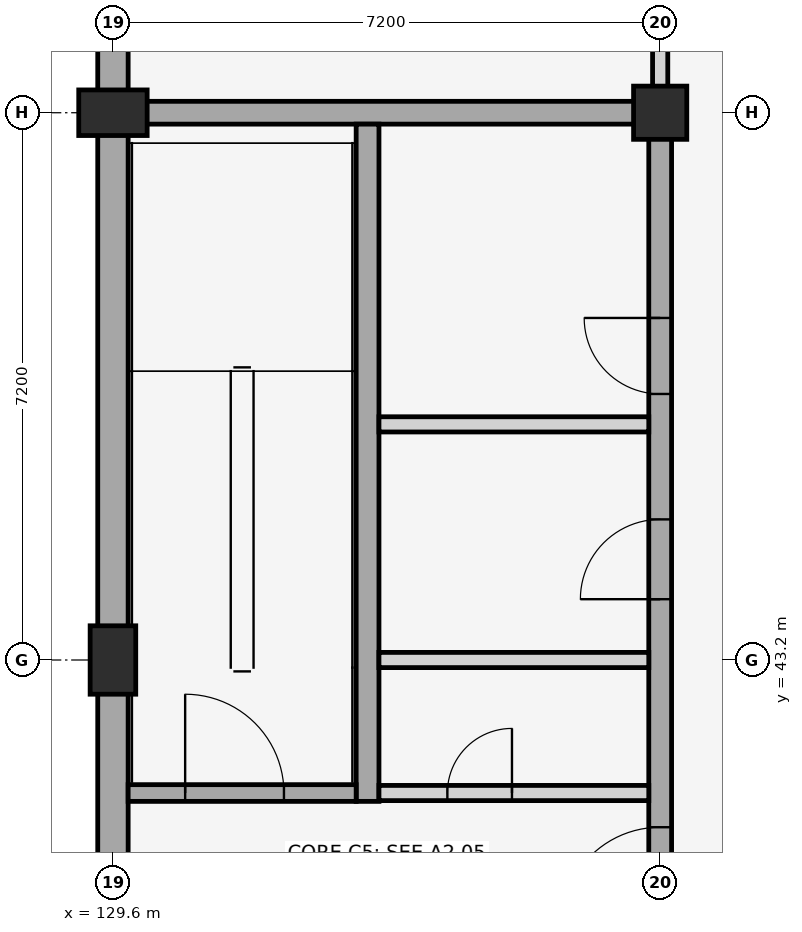
"""IFC4 building model, lengths in metres.
Left out: names, types, materials, properties, quantities, classifications, styles, units other than length and angle.
Written with IfcOpenShell. Run it as: python <this file> out.ifc"""

import sys

from ifc_helpers import new_model, si_unit, direction, frame, frame_2d, origin, origin_2d, place, context, subcontext, project, spatial, rectangle, extrude, element, fill, save


model = new_model("IFC4")
c1 = context("Model", 3, precision=1e-05, world=origin(), true_north=direction((0.0, 1.0)))
c2 = subcontext(c1, "Body", "Model", "MODEL_VIEW")
j1 = project(units=[si_unit("LENGTHUNIT", "METRE"), si_unit("PLANEANGLEUNIT", "RADIAN")], contexts=[c1])
p1 = place(None, origin())
s1 = spatial("IfcSite", under=j1, at=p1, CompositionType="ELEMENT")
p2 = place(p1, origin())
s2 = spatial("IfcBuilding", under=s1, at=p2, CompositionType="ELEMENT")
p3 = place(p2, frame((0.0, 0.0, -4.5)))
s3 = spatial("IfcBuildingStorey", under=s2, at=p3, CompositionType="ELEMENT", Elevation=-4.5)
p4 = place(p3, frame((129.6, 100.6, 0.0), z_axis=(0.0, 0.0, 1.0), x_axis=(0.0, -1.0, 0.0)))
e1 = element("IfcWall", 1, at=p4, inside=s3, PredefinedType="USERDEFINED", context=c2, shape_type="SweptSolid", body=[
    extrude(rectangle(XDim=86.0, YDim=0.4, at=frame_2d((43.0, 0.0))), origin(), (0.0, 0.0, 1.0), 3.67),
])
for number, where, z_axis, x_axis in (
    (2, (129.6, 43.2, -0.45), (0.0, 0.0, 1.0), (1.0, 0.0, 0.0)),
    (3, (129.6, 50.4, -0.45), (0.0, 0.0, 1.0), (0.0, 1.0, 0.0)),
):
    element("IfcColumn", number, at=place(p3, frame(where, z_axis=z_axis, x_axis=x_axis)), inside=s3, PredefinedType="PILASTER", context=c2, shape_type="SweptSolid", body=[
        extrude(rectangle(XDim=0.6, YDim=0.9, at=origin_2d()), origin(), (0.0, 0.0, 1.0), 4.95),
    ])
p5 = place(p3, frame((136.8, 50.4, -0.45), z_axis=(0.0, 0.0, 1.0), x_axis=(1.0, 0.0, 0.0)))
e4 = element("IfcColumn", 4, at=p5, inside=s3, PredefinedType="COLUMN", context=c2, shape_type="SweptSolid", body=[
    extrude(rectangle(XDim=0.7, YDim=0.7, at=origin_2d()), origin(), (0.0, 0.0, 1.0), 4.95),
])
p6 = place(p3, frame((129.8, 50.4, 0.0), z_axis=(0.0, 0.0, 1.0), x_axis=(1.0, 0.0, 0.0)))
e5 = element("IfcWall", 5, at=p6, inside=s3, PredefinedType="SHEAR", context=c2, shape_type="SweptSolid", body=[
    extrude(rectangle(XDim=7.15, YDim=0.3, at=frame_2d((3.575, 0.0))), origin(), (0.0, 0.0, 1.0), 4.25),
])
p7 = place(p3, frame((136.8, 36.15, 0.0), z_axis=(0.0, 0.0, 1.0), x_axis=(0.0, 1.0, 0.0)))
e6 = element("IfcWall", 6, at=p7, inside=s3, PredefinedType="SHEAR", context=c2, shape_type="SweptSolid", body=[
    extrude(rectangle(XDim=14.1, YDim=0.3, at=frame_2d((7.05, 0.0))), origin(), (0.0, 0.0, 1.0), 4.25),
])
p8 = place(p7, frame((3.55, 0.0, 0.0)))
e7 = element("IfcOpeningElement", 7, at=p8, cuts=e6, PredefinedType="OPENING", context=c2, shape_type="SweptSolid", body=[
    extrude(rectangle(XDim=1.3, YDim=2.2, at=frame_2d((0.65, 1.1))), frame((0.0, 0.16, 0.0), z_axis=(0.0, -1.0, 0.0), x_axis=(1.0, 0.0, 0.0)), (0.0, 0.0, 1.0), 0.32),
])
p9 = place(p7, frame((7.85, 0.0, 0.0)))
e8 = element("IfcOpeningElement", 8, at=p9, cuts=e6, PredefinedType="OPENING", context=c2, shape_type="SweptSolid", body=[
    extrude(rectangle(XDim=1.05, YDim=2.15, at=frame_2d((0.525, 1.075))), frame((0.0, 0.16, 0.0), z_axis=(0.0, -1.0, 0.0), x_axis=(1.0, 0.0, 0.0)), (0.0, 0.0, 1.0), 0.32),
])
p10 = place(p7, frame((10.55, 0.0, 0.0)))
e9 = element("IfcOpeningElement", 9, at=p10, cuts=e6, PredefinedType="OPENING", context=c2, shape_type="SweptSolid", body=[
    extrude(rectangle(XDim=1.0, YDim=2.15, at=frame_2d((0.5, 1.075))), frame((0.0, 0.16, 0.0), z_axis=(0.0, -1.0, 0.0), x_axis=(1.0, 0.0, 0.0)), (0.0, 0.0, 1.0), 0.32),
])
p11 = place(p3, frame((132.95, 41.34, 0.0), z_axis=(0.0, 0.0, 1.0), x_axis=(0.0, 1.0, 0.0)))
e10 = element("IfcWall", 10, at=p11, inside=s3, PredefinedType="SHEAR", context=c2, shape_type="SweptSolid", body=[
    extrude(rectangle(XDim=8.91, YDim=0.3, at=frame_2d((4.455, 0.0))), origin(), (0.0, 0.0, 1.0), 4.25),
])
p12 = place(p3, frame((133.1, 41.45, 0.0), z_axis=(0.0, 0.0, 1.0), x_axis=(1.0, 0.0, 0.0)))
e11 = element("IfcWall", 11, at=p12, inside=s3, PredefinedType="PLUMBINGWALL", context=c2, shape_type="SweptSolid", body=[
    extrude(rectangle(XDim=3.55, YDim=0.2, at=frame_2d((1.775, 0.0))), origin(), (0.0, 0.0, 1.0), 3.67),
])
p13 = place(p12, frame((0.9, 0.0, 0.0)))
e12 = element("IfcOpeningElement", 12, at=p13, cuts=e11, PredefinedType="OPENING", context=c2, shape_type="SweptSolid", body=[
    extrude(rectangle(XDim=0.85, YDim=2.05, at=frame_2d((0.425, 1.025))), frame((0.0, 0.11, 0.0), z_axis=(0.0, -1.0, 0.0), x_axis=(1.0, 0.0, 0.0)), (0.0, 0.0, 1.0), 0.22),
])
p14 = place(p3, frame((129.8, 41.45, 0.0), z_axis=(0.0, 0.0, 1.0), x_axis=(1.0, 0.0, 0.0)))
e13 = element("IfcWall", 13, at=p14, inside=s3, PredefinedType="SHEAR", context=c2, shape_type="SweptSolid", body=[
    extrude(rectangle(XDim=3.0, YDim=0.22, at=frame_2d((1.5, 0.0))), origin(), (0.0, 0.0, 1.0), 4.25),
])
p15 = place(p14, frame((0.75, 0.0, 0.0)))
e14 = element("IfcOpeningElement", 14, at=p15, cuts=e13, PredefinedType="OPENING", context=c2, shape_type="SweptSolid", body=[
    extrude(rectangle(XDim=1.3, YDim=2.2, at=frame_2d((0.65, 1.1))), frame((0.0, 0.12, 0.0), z_axis=(0.0, -1.0, 0.0), x_axis=(1.0, 0.0, 0.0)), (0.0, 0.0, 1.0), 0.24),
])
for number, where, z_axis, x_axis in (
    (15, (133.1, 43.2, 0.0), (0.0, 0.0, 1.0), (1.0, 0.0, 0.0)),
    (16, (133.1, 46.3, 0.0), (0.0, 0.0, 1.0), (1.0, 0.0, 0.0)),
):
    element("IfcWall", number, at=place(p3, frame(where, z_axis=z_axis, x_axis=x_axis)), inside=s3, PredefinedType="PLUMBINGWALL", context=c2, shape_type="SweptSolid", body=[
        extrude(rectangle(XDim=3.55, YDim=0.2, at=frame_2d((1.775, 0.0))), origin(), (0.0, 0.0, 1.0), 3.67),
    ])
p16 = place(p3, frame((136.8, 50.72, 0.0), z_axis=(0.0, 0.0, 1.0), x_axis=(0.0, 1.0, 0.0)))
e17 = element("IfcWall", 17, at=p16, inside=s3, PredefinedType="PARTITIONING", context=c2, shape_type="SweptSolid", body=[
    extrude(rectangle(XDim=28.16, YDim=0.2, at=frame_2d((14.08, 0.0))), origin(), (0.0, 0.0, 1.0), 3.45),
])
p17 = place(p16, frame((1.649, 0.0, 0.0)))
e18 = element("IfcOpeningElement", 18, at=p17, cuts=e17, PredefinedType="OPENING", context=c2, shape_type="SweptSolid", body=[
    extrude(rectangle(XDim=1.6, YDim=2.35, at=frame_2d((0.8, 1.175))), frame((0.0, 0.11, 0.0), z_axis=(0.0, -1.0, 0.0), x_axis=(1.0, 0.0, 0.0)), (0.0, 0.0, 1.0), 0.22),
])
p18 = place(p8, origin())
e19 = element("IfcDoor", 19, at=p18, inside=s3, OperationType="SINGLE_SWING_LEFT", PredefinedType="DOOR", context=c2, shape_type="SweptSolid", body=[
    extrude(rectangle(XDim=1.3, YDim=2.2, at=frame_2d((0.65, 1.1))), frame((0.0, 0.025, 0.0), z_axis=(0.0, -1.0, 0.0), x_axis=(1.0, 0.0, 0.0)), (0.0, 0.0, 1.0), 0.05),
])
fill(e7, e19)
p19 = place(p9, origin())
e20 = element("IfcDoor", 20, at=p19, inside=s3, OperationType="SINGLE_SWING_LEFT", PredefinedType="DOOR", context=c2, shape_type="SweptSolid", body=[
    extrude(rectangle(XDim=1.05, YDim=2.15, at=frame_2d((0.525, 1.075))), frame((0.0, 0.025, 0.0), z_axis=(0.0, -1.0, 0.0), x_axis=(1.0, 0.0, 0.0)), (0.0, 0.0, 1.0), 0.05),
])
fill(e8, e20)
p20 = place(p10, origin())
e21 = element("IfcDoor", 21, at=p20, inside=s3, OperationType="SINGLE_SWING_RIGHT", PredefinedType="DOOR", context=c2, shape_type="SweptSolid", body=[
    extrude(rectangle(XDim=1.0, YDim=2.15, at=frame_2d((0.5, 1.075))), frame((0.0, 0.025, 0.0), z_axis=(0.0, -1.0, 0.0), x_axis=(1.0, 0.0, 0.0)), (0.0, 0.0, 1.0), 0.05),
])
fill(e9, e21)
p21 = place(p13, origin())
e22 = element("IfcDoor", 22, at=p21, inside=s3, OperationType="SINGLE_SWING_RIGHT", PredefinedType="TRAPDOOR", context=c2, shape_type="SweptSolid", body=[
    extrude(rectangle(XDim=0.85, YDim=2.05, at=frame_2d((0.425, 1.025))), frame((0.0, 0.025, 0.0), z_axis=(0.0, -1.0, 0.0), x_axis=(1.0, 0.0, 0.0)), (0.0, 0.0, 1.0), 0.05),
])
fill(e12, e22)
p22 = place(p15, origin())
e23 = element("IfcDoor", 23, at=p22, inside=s3, OperationType="SINGLE_SWING_LEFT", PredefinedType="DOOR", context=c2, shape_type="SweptSolid", body=[
    extrude(rectangle(XDim=1.3, YDim=2.2, at=frame_2d((0.65, 1.1))), frame((0.0, 0.025, 0.0), z_axis=(0.0, -1.0, 0.0), x_axis=(1.0, 0.0, 0.0)), (0.0, 0.0, 1.0), 0.05),
])
fill(e14, e23)
save(model, sys.argv[1])
